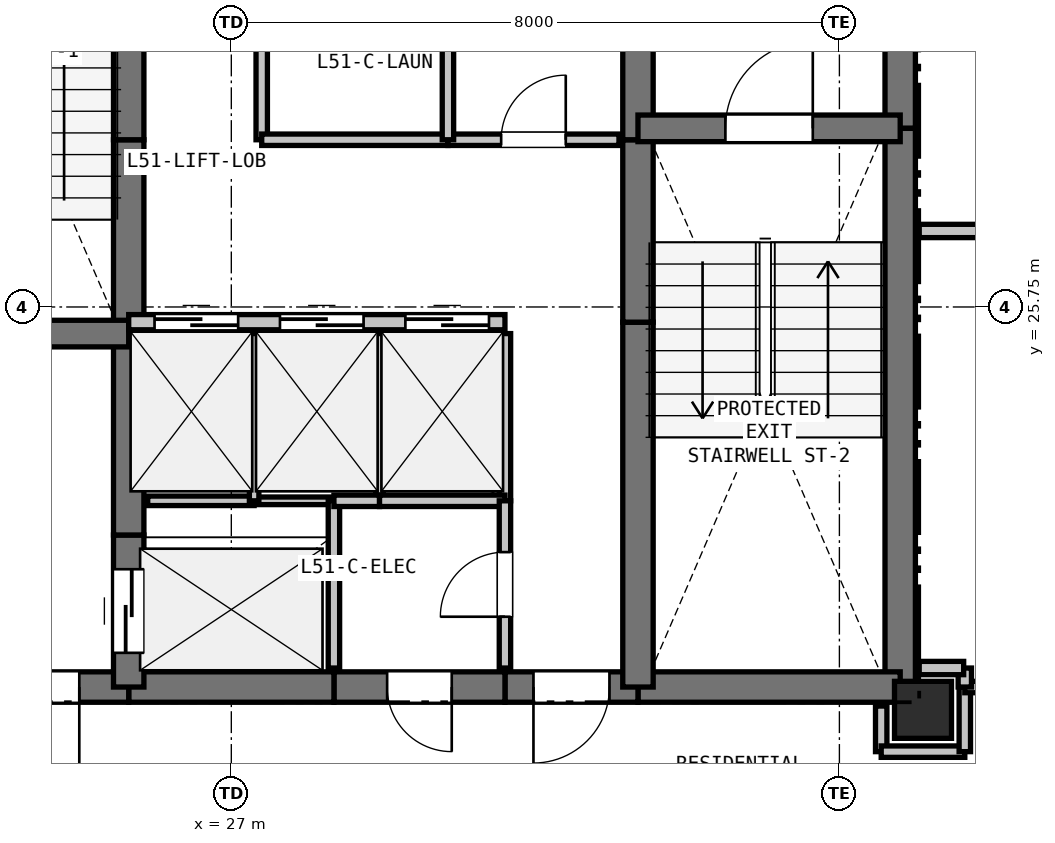
"""IFC4 building model, lengths in metres.
Left out: names, types, materials, properties, quantities, classifications, styles, units other than length and angle.
Written with IfcOpenShell. Run it as: python <this file> out.ifc"""

import sys

from ifc_helpers import new_model, si_unit, direction, frame, frame_2d, origin, origin_2d, place, context, subcontext, project, spatial, rectangle, extrude, element, fill, save


model = new_model("IFC4")
c1 = context("Model", 3, precision=1e-05, world=origin(), true_north=direction((0.0, 1.0)))
c2 = subcontext(c1, "Body", "Model", "MODEL_VIEW")
j1 = project(units=[si_unit("LENGTHUNIT", "METRE"), si_unit("PLANEANGLEUNIT", "RADIAN")], contexts=[c1])
p1 = place(None, origin())
s1 = spatial("IfcSite", under=j1, at=p1, CompositionType="ELEMENT")
p2 = place(p1, origin())
s2 = spatial("IfcBuilding", under=s1, at=p2, CompositionType="ELEMENT")
p3 = place(p2, frame((0.0, 0.0, 185.4)))
s3 = spatial("IfcBuildingStorey", under=s2, at=p3, CompositionType="ELEMENT", Elevation=185.4)
p4 = place(p3, frame((36.1, 20.45, 0.0), z_axis=(0.0, 0.0, 1.0), x_axis=(1.0, 0.0, 0.0)))
e1 = element("IfcColumn", 1, at=p4, inside=s3, PredefinedType="COLUMN", context=c2, shape_type="SweptSolid", body=[
    extrude(rectangle(XDim=0.75, YDim=0.75, at=origin_2d()), origin(), (0.0, 0.0, 1.0), 3.3),
])
p5 = place(p3, frame((35.8, 32.75, 0.0), z_axis=(0.0, 0.0, 1.0), x_axis=(0.0, -1.0, 0.0)))
e2 = element("IfcWall", 2, at=p5, inside=s3, PredefinedType="SHEAR", context=c2, shape_type="SweptSolid", body=[
    extrude(rectangle(XDim=4.65, YDim=0.4, at=frame_2d((2.325, 0.0))), origin(), (0.0, 0.0, 1.0), 3.07),
])
p6 = place(p3, frame((35.8, 28.1, 0.0), z_axis=(0.0, 0.0, 1.0), x_axis=(0.0, -1.0, 0.0)))
e3 = element("IfcWall", 3, at=p6, inside=s3, PredefinedType="SHEAR", context=c2, shape_type="SweptSolid", body=[
    extrude(rectangle(XDim=7.35, YDim=0.4, at=frame_2d((3.675, 0.0))), origin(), (0.0, 0.0, 1.0), 3.07),
])
p7 = place(p3, frame((35.8, 20.75, 0.0), z_axis=(0.0, 0.0, 1.0), x_axis=(-1.0, 0.0, 0.0)))
e4 = element("IfcWall", 4, at=p7, inside=s3, PredefinedType="SHEAR", context=c2, shape_type="SweptSolid", body=[
    extrude(rectangle(XDim=3.45, YDim=0.4, at=frame_2d((1.725, 0.0))), origin(), (0.0, 0.0, 1.0), 3.07),
])
p8 = place(p3, frame((32.35, 20.75, 0.0), z_axis=(0.0, 0.0, 1.0), x_axis=(-1.0, 0.0, 0.0)))
e5 = element("IfcWall", 5, at=p8, inside=s3, PredefinedType="SHEAR", context=c2, shape_type="SweptSolid", body=[
    extrude(rectangle(XDim=1.75, YDim=0.4, at=frame_2d((0.875, 0.0))), origin(), (0.0, 0.0, 1.0), 3.07),
])
p9 = place(p8, frame((0.375, 0.0, 0.0)))
e6 = element("IfcOpeningElement", 6, at=p9, cuts=e5, PredefinedType="OPENING", context=c2, shape_type="SweptSolid", body=[
    extrude(rectangle(XDim=1.0, YDim=2.15, at=frame_2d((0.5, 1.075))), frame((0.0, 0.21, 0.0), z_axis=(0.0, -1.0, 0.0), x_axis=(1.0, 0.0, 0.0)), (0.0, 0.0, 1.0), 0.42),
])
p10 = place(p3, frame((30.6, 20.75, 0.0), z_axis=(0.0, 0.0, 1.0), x_axis=(-1.0, 0.0, 0.0)))
e7 = element("IfcWall", 7, at=p10, inside=s3, PredefinedType="SHEAR", context=c2, shape_type="SweptSolid", body=[
    extrude(rectangle(XDim=2.25, YDim=0.4, at=frame_2d((1.125, 0.0))), origin(), (0.0, 0.0, 1.0), 3.07),
])
p11 = place(p10, frame((0.7, 0.0, 0.0)))
e8 = element("IfcOpeningElement", 8, at=p11, cuts=e7, PredefinedType="OPENING", context=c2, shape_type="SweptSolid", body=[
    extrude(rectangle(XDim=0.85, YDim=2.1, at=frame_2d((0.425, 1.05))), frame((0.0, 0.21, 0.0), z_axis=(0.0, -1.0, 0.0), x_axis=(1.0, 0.0, 0.0)), (0.0, 0.0, 1.0), 0.42),
])
p12 = place(p3, frame((28.35, 20.75, 0.0), z_axis=(0.0, 0.0, 1.0), x_axis=(-1.0, 0.0, 0.0)))
e9 = element("IfcWall", 9, at=p12, inside=s3, PredefinedType="SHEAR", context=c2, shape_type="SweptSolid", body=[
    extrude(rectangle(XDim=2.7, YDim=0.4, at=frame_2d((1.35, 0.0))), origin(), (0.0, 0.0, 1.0), 3.07),
])
p13 = place(p3, frame((25.65, 20.75, 0.0), z_axis=(0.0, 0.0, 1.0), x_axis=(-1.0, 0.0, 0.0)))
e10 = element("IfcWall", 10, at=p13, inside=s3, PredefinedType="SHEAR", context=c2, shape_type="SweptSolid", body=[
    extrude(rectangle(XDim=3.45, YDim=0.4, at=frame_2d((1.725, 0.0))), origin(), (0.0, 0.0, 1.0), 3.07),
])
p14 = place(p13, frame((0.65, 0.0, 0.0)))
e11 = element("IfcOpeningElement", 11, at=p14, cuts=e10, PredefinedType="OPENING", context=c2, shape_type="SweptSolid", body=[
    extrude(rectangle(XDim=1.15, YDim=2.15, at=frame_2d((0.575, 1.075))), frame((0.0, 0.21, 0.0), z_axis=(0.0, -1.0, 0.0), x_axis=(1.0, 0.0, 0.0)), (0.0, 0.0, 1.0), 0.42),
])
p15 = place(p3, frame((25.65, 20.75, 0.0), z_axis=(0.0, 0.0, 1.0), x_axis=(0.0, 1.0, 0.0)))
e12 = element("IfcWall", 12, at=p15, inside=s3, PredefinedType="SHEAR", context=c2, shape_type="SweptSolid", body=[
    extrude(rectangle(XDim=2.0, YDim=0.4, at=frame_2d((1.0, 0.0))), origin(), (0.0, 0.0, 1.0), 3.07),
])
p16 = place(p15, frame((0.45, 0.0, 0.0)))
e13 = element("IfcOpeningElement", 13, at=p16, cuts=e12, PredefinedType="OPENING", context=c2, shape_type="SweptSolid", body=[
    extrude(rectangle(XDim=1.1, YDim=2.15, at=frame_2d((0.55, 1.075))), frame((0.0, 0.21, 0.0), z_axis=(0.0, -1.0, 0.0), x_axis=(1.0, 0.0, 0.0)), (0.0, 0.0, 1.0), 0.42),
])
p17 = place(p3, frame((25.65, 22.75, 0.0), z_axis=(0.0, 0.0, 1.0), x_axis=(0.0, 1.0, 0.0)))
e14 = element("IfcWall", 14, at=p17, inside=s3, PredefinedType="SHEAR", context=c2, shape_type="SweptSolid", body=[
    extrude(rectangle(XDim=2.8, YDim=0.4, at=frame_2d((1.4, 0.0))), origin(), (0.0, 0.0, 1.0), 3.07),
])
p18 = place(p3, frame((25.65, 25.55, 0.0), z_axis=(0.0, 0.0, 1.0), x_axis=(0.0, 1.0, 0.0)))
e15 = element("IfcWall", 15, at=p18, inside=s3, PredefinedType="SHEAR", context=c2, shape_type="SweptSolid", body=[
    extrude(rectangle(XDim=2.4, YDim=0.4, at=frame_2d((1.2, 0.0))), origin(), (0.0, 0.0, 1.0), 3.07),
])
for number, where, z_axis, x_axis in (
    (16, (25.65, 27.95, 0.0), (0.0, 0.0, 1.0), (0.0, 1.0, 0.0)),
    (17, (32.35, 20.75, 0.0), (0.0, 0.0, 1.0), (0.0, 1.0, 0.0)),
):
    element("IfcWall", number, at=place(p3, frame(where, z_axis=z_axis, x_axis=x_axis)), inside=s3, PredefinedType="SHEAR", context=c2, shape_type="SweptSolid", body=[
        extrude(rectangle(XDim=4.8, YDim=0.4, at=frame_2d((2.4, 0.0))), origin(), (0.0, 0.0, 1.0), 3.07),
    ])
p19 = place(p3, frame((32.35, 25.55, 0.0), z_axis=(0.0, 0.0, 1.0), x_axis=(0.0, 1.0, 0.0)))
e18 = element("IfcWall", 18, at=p19, inside=s3, PredefinedType="SHEAR", context=c2, shape_type="SweptSolid", body=[
    extrude(rectangle(XDim=2.4, YDim=0.4, at=frame_2d((1.2, 0.0))), origin(), (0.0, 0.0, 1.0), 3.07),
])
p20 = place(p3, frame((32.35, 27.95, 0.0), z_axis=(0.0, 0.0, 1.0), x_axis=(0.0, 1.0, 0.0)))
e19 = element("IfcWall", 19, at=p20, inside=s3, PredefinedType="SHEAR", context=c2, shape_type="SweptSolid", body=[
    extrude(rectangle(XDim=2.8, YDim=0.4, at=frame_2d((1.4, 0.0))), origin(), (0.0, 0.0, 1.0), 3.07),
])
p21 = place(p3, frame((22.2, 25.4, 0.0), z_axis=(0.0, 0.0, 1.0), x_axis=(1.0, 0.0, 0.0)))
e20 = element("IfcWall", 20, at=p21, inside=s3, PredefinedType="SHEAR", context=c2, shape_type="SweptSolid", body=[
    extrude(rectangle(XDim=3.45, YDim=0.35, at=frame_2d((1.725, 0.0))), origin(), (0.0, 0.0, 1.0), 3.07),
])
p22 = place(p21, frame((1.15, 0.0, 0.0)))
e21 = element("IfcOpeningElement", 21, at=p22, cuts=e20, PredefinedType="OPENING", context=c2, shape_type="SweptSolid", body=[
    extrude(rectangle(XDim=1.15, YDim=2.15, at=frame_2d((0.575, 1.075))), frame((0.0, 0.185, 0.0), z_axis=(0.0, -1.0, 0.0), x_axis=(1.0, 0.0, 0.0)), (0.0, 0.0, 1.0), 0.37),
])
p23 = place(p3, frame((32.35, 28.1, 0.0), z_axis=(0.0, 0.0, 1.0), x_axis=(1.0, 0.0, 0.0)))
e22 = element("IfcWall", 22, at=p23, inside=s3, PredefinedType="SHEAR", context=c2, shape_type="SweptSolid", body=[
    extrude(rectangle(XDim=3.45, YDim=0.35, at=frame_2d((1.725, 0.0))), origin(), (0.0, 0.0, 1.0), 3.07),
])
p24 = place(p23, frame((1.15, 0.0, 0.0)))
e23 = element("IfcOpeningElement", 23, at=p24, cuts=e22, PredefinedType="OPENING", context=c2, shape_type="SweptSolid", body=[
    extrude(rectangle(XDim=1.15, YDim=2.15, at=frame_2d((0.575, 1.075))), frame((0.0, 0.185, 0.0), z_axis=(0.0, -1.0, 0.0), x_axis=(1.0, 0.0, 0.0)), (0.0, 0.0, 1.0), 0.37),
])
p25 = place(p3, frame((25.65, 25.55, 0.0), z_axis=(0.0, 0.0, 1.0), x_axis=(1.0, 0.0, 0.0)))
e24 = element("IfcWall", 24, at=p25, inside=s3, PredefinedType="PARTITIONING", context=c2, shape_type="SweptSolid", body=[
    extrude(rectangle(XDim=4.95, YDim=0.2, at=frame_2d((2.475, 0.0))), origin(), (0.0, 0.0, 1.0), 3.07),
])
p26 = place(p25, frame((0.34, 0.0, 0.0)))
e25 = element("IfcOpeningElement", 25, at=p26, cuts=e24, PredefinedType="OPENING", context=c2, shape_type="SweptSolid", body=[
    extrude(rectangle(XDim=1.1, YDim=2.15, at=frame_2d((0.55, 1.075))), frame((0.0, 0.11, 0.0), z_axis=(0.0, -1.0, 0.0), x_axis=(1.0, 0.0, 0.0)), (0.0, 0.0, 1.0), 0.22),
])
p27 = place(p25, frame((1.99, 0.0, 0.0)))
e26 = element("IfcOpeningElement", 26, at=p27, cuts=e24, PredefinedType="OPENING", context=c2, shape_type="SweptSolid", body=[
    extrude(rectangle(XDim=1.1, YDim=2.15, at=frame_2d((0.55, 1.075))), frame((0.0, 0.11, 0.0), z_axis=(0.0, -1.0, 0.0), x_axis=(1.0, 0.0, 0.0)), (0.0, 0.0, 1.0), 0.22),
])
p28 = place(p25, frame((3.64, 0.0, 0.0)))
e27 = element("IfcOpeningElement", 27, at=p28, cuts=e24, PredefinedType="OPENING", context=c2, shape_type="SweptSolid", body=[
    extrude(rectangle(XDim=1.1, YDim=2.15, at=frame_2d((0.55, 1.075))), frame((0.0, 0.11, 0.0), z_axis=(0.0, -1.0, 0.0), x_axis=(1.0, 0.0, 0.0)), (0.0, 0.0, 1.0), 0.22),
])
p29 = place(p3, frame((25.9, 23.2, 0.0), z_axis=(0.0, 0.0, 1.0), x_axis=(1.0, 0.0, 0.0)))
e28 = element("IfcWall", 28, at=p29, inside=s3, PredefinedType="PARTITIONING", context=c2, shape_type="SweptSolid", body=[
    extrude(rectangle(XDim=1.4, YDim=0.125, at=frame_2d((0.7, 0.0))), origin(), (0.0, 0.0, 1.0), 3.07),
])
p30 = place(p3, frame((27.3, 23.2, 0.0), z_axis=(0.0, 0.0, 1.0), x_axis=(1.0, 0.0, 0.0)))
e29 = element("IfcWall", 29, at=p30, inside=s3, PredefinedType="PARTITIONING", context=c2, shape_type="SweptSolid", body=[
    extrude(rectangle(XDim=1.05, YDim=0.1, at=frame_2d((0.525, 0.0))), origin(), (0.0, 0.0, 1.0), 3.07),
])
p31 = place(p3, frame((28.35, 23.2, 0.0), z_axis=(0.0, 0.0, 1.0), x_axis=(0.0, -1.0, 0.0)))
e30 = element("IfcWall", 30, at=p31, inside=s3, PredefinedType="PARTITIONING", context=c2, shape_type="SweptSolid", body=[
    extrude(rectangle(XDim=2.2, YDim=0.15, at=frame_2d((1.1, 0.0))), origin(), (0.0, 0.0, 1.0), 3.07),
])
p32 = place(p3, frame((27.3, 25.4, 0.0), z_axis=(0.0, 0.0, 1.0), x_axis=(0.0, -1.0, 0.0)))
e31 = element("IfcWall", 31, at=p32, inside=s3, PredefinedType="PARTITIONING", context=c2, shape_type="SweptSolid", body=[
    extrude(rectangle(XDim=2.2, YDim=0.125, at=frame_2d((1.1, 0.0))), origin(), (0.0, 0.0, 1.0), 3.07),
])
p33 = place(p3, frame((28.95, 25.4, 0.0), z_axis=(0.0, 0.0, 1.0), x_axis=(0.0, -1.0, 0.0)))
e32 = element("IfcWall", 32, at=p33, inside=s3, PredefinedType="PARTITIONING", context=c2, shape_type="SweptSolid", body=[
    extrude(rectangle(XDim=2.2, YDim=0.1, at=frame_2d((1.1, 0.0))), origin(), (0.0, 0.0, 1.0), 3.07),
])
p34 = place(p3, frame((28.95, 23.2, 0.0), z_axis=(0.0, 0.0, 1.0), x_axis=(-1.0, 0.0, 0.0)))
e33 = element("IfcWall", 33, at=p34, inside=s3, PredefinedType="PARTITIONING", context=c2, shape_type="SweptSolid", body=[
    extrude(rectangle(XDim=0.6, YDim=0.15, at=frame_2d((0.3, 0.0))), origin(), (0.0, 0.0, 1.0), 3.07),
])
p35 = place(p3, frame((30.6, 25.4, 0.0), z_axis=(0.0, 0.0, 1.0), x_axis=(0.0, -1.0, 0.0)))
e34 = element("IfcWall", 34, at=p35, inside=s3, PredefinedType="PARTITIONING", context=c2, shape_type="SweptSolid", body=[
    extrude(rectangle(XDim=2.2, YDim=0.15, at=frame_2d((1.1, 0.0))), origin(), (0.0, 0.0, 1.0), 3.07),
])
p36 = place(p3, frame((30.6, 23.2, 0.0), z_axis=(0.0, 0.0, 1.0), x_axis=(-1.0, 0.0, 0.0)))
e35 = element("IfcWall", 35, at=p36, inside=s3, PredefinedType="PARTITIONING", context=c2, shape_type="SweptSolid", body=[
    extrude(rectangle(XDim=1.65, YDim=0.15, at=frame_2d((0.825, 0.0))), origin(), (0.0, 0.0, 1.0), 3.07),
])
p37 = place(p3, frame((30.6, 21.0, 0.0), z_axis=(0.0, 0.0, 1.0), x_axis=(0.0, 1.0, 0.0)))
e36 = element("IfcWall", 36, at=p37, inside=s3, PredefinedType="PARTITIONING", context=c2, shape_type="SweptSolid", body=[
    extrude(rectangle(XDim=2.2, YDim=0.15, at=frame_2d((1.1, 0.0))), origin(), (0.0, 0.0, 1.0), 3.07),
])
p38 = place(p37, frame((0.675, 0.0, 0.0)))
e37 = element("IfcOpeningElement", 37, at=p38, cuts=e36, PredefinedType="OPENING", context=c2, shape_type="SweptSolid", body=[
    extrude(rectangle(XDim=0.85, YDim=2.1, at=frame_2d((0.425, 1.05))), frame((0.0, 0.085, 0.0), z_axis=(0.0, -1.0, 0.0), x_axis=(1.0, 0.0, 0.0)), (0.0, 0.0, 1.0), 0.17),
])
p39 = place(p3, frame((27.4, 32.5, 0.0), z_axis=(0.0, 0.0, 1.0), x_axis=(0.0, -1.0, 0.0)))
e38 = element("IfcWall", 38, at=p39, inside=s3, PredefinedType="PARTITIONING", context=c2, shape_type="SweptSolid", body=[
    extrude(rectangle(XDim=4.55, YDim=0.15, at=frame_2d((2.275, 0.0))), origin(), (0.0, 0.0, 1.0), 3.07),
])
p40 = place(p39, frame((1.775, 0.0, 0.0)))
e39 = element("IfcOpeningElement", 39, at=p40, cuts=e38, PredefinedType="OPENING", context=c2, shape_type="SweptSolid", body=[
    extrude(rectangle(XDim=1.0, YDim=2.15, at=frame_2d((0.5, 1.075))), frame((0.0, 0.085, 0.0), z_axis=(0.0, -1.0, 0.0), x_axis=(1.0, 0.0, 0.0)), (0.0, 0.0, 1.0), 0.17),
])
p41 = place(p3, frame((27.4, 27.95, 0.0), z_axis=(0.0, 0.0, 1.0), x_axis=(1.0, 0.0, 0.0)))
e40 = element("IfcWall", 40, at=p41, inside=s3, PredefinedType="PARTITIONING", context=c2, shape_type="SweptSolid", body=[
    extrude(rectangle(XDim=2.45, YDim=0.15, at=frame_2d((1.225, 0.0))), origin(), (0.0, 0.0, 1.0), 3.07),
])
p42 = place(p3, frame((29.85, 27.95, 0.0), z_axis=(0.0, 0.0, 1.0), x_axis=(1.0, 0.0, 0.0)))
e41 = element("IfcWall", 41, at=p42, inside=s3, PredefinedType="PARTITIONING", context=c2, shape_type="SweptSolid", body=[
    extrude(rectangle(XDim=2.25, YDim=0.15, at=frame_2d((1.125, 0.0))), origin(), (0.0, 0.0, 1.0), 3.07),
])
p43 = place(p42, frame((0.7, 0.0, 0.0)))
e42 = element("IfcOpeningElement", 42, at=p43, cuts=e41, PredefinedType="OPENING", context=c2, shape_type="SweptSolid", body=[
    extrude(rectangle(XDim=0.85, YDim=2.1, at=frame_2d((0.425, 1.05))), frame((0.0, 0.085, 0.0), z_axis=(0.0, -1.0, 0.0), x_axis=(1.0, 0.0, 0.0)), (0.0, 0.0, 1.0), 0.17),
])
p44 = place(p3, frame((35.55, 20.5, 0.0), z_axis=(0.0, 0.0, 1.0), x_axis=(0.0, -1.0, 0.0)))
e43 = element("IfcWall", 43, at=p44, inside=s3, PredefinedType="PARTITIONING", context=c2, shape_type="SweptSolid", body=[
    extrude(rectangle(XDim=0.6, YDim=0.15, at=frame_2d((0.3, 0.0))), origin(), (0.0, 0.0, 1.0), 2.595),
])
p45 = place(p3, frame((35.55, 19.9, 0.0), z_axis=(0.0, 0.0, 1.0), x_axis=(1.0, 0.0, 0.0)))
e44 = element("IfcWall", 44, at=p45, inside=s3, PredefinedType="PARTITIONING", context=c2, shape_type="SweptSolid", body=[
    extrude(rectangle(XDim=1.1, YDim=0.15, at=frame_2d((0.55, 0.0))), origin(), (0.0, 0.0, 1.0), 2.518),
])
p46 = place(p3, frame((36.65, 19.9, 0.0), z_axis=(0.0, 0.0, 1.0), x_axis=(0.0, 1.0, 0.0)))
e45 = element("IfcWall", 45, at=p46, inside=s3, PredefinedType="PARTITIONING", context=c2, shape_type="SweptSolid", body=[
    extrude(rectangle(XDim=0.85, YDim=0.15, at=frame_2d((0.425, 0.0))), origin(), (0.0, 0.0, 1.0), 3.07),
])
p47 = place(p3, frame((36.65, 20.75, 0.0), z_axis=(0.0, 0.0, 1.0), x_axis=(1.0, 0.0, 0.0)))
e46 = element("IfcWall", 46, at=p47, inside=s3, PredefinedType="PARTITIONING", context=c2, shape_type="SweptSolid", body=[
    extrude(rectangle(XDim=2.55, YDim=0.15, at=frame_2d((1.275, 0.0))), origin(), (0.0, 0.0, 1.0), 3.07),
])
p48 = place(p47, frame((0.85, 0.0, 0.0)))
e47 = element("IfcOpeningElement", 47, at=p48, cuts=e46, PredefinedType="OPENING", context=c2, shape_type="SweptSolid", body=[
    extrude(rectangle(XDim=0.85, YDim=2.1, at=frame_2d((0.425, 1.05))), frame((0.0, 0.085, 0.0), z_axis=(0.0, -1.0, 0.0), x_axis=(1.0, 0.0, 0.0)), (0.0, 0.0, 1.0), 0.17),
])
p49 = place(p3, frame((40.55, 26.75, 0.0), z_axis=(0.0, 0.0, 1.0), x_axis=(-1.0, 0.0, 0.0)))
e48 = element("IfcWall", 48, at=p49, inside=s3, PredefinedType="PLUMBINGWALL", context=c2, shape_type="SweptSolid", body=[
    extrude(rectangle(XDim=4.5, YDim=0.175, at=frame_2d((2.25, 0.0))), origin(), (0.0, 0.0, 1.0), 2.365),
])
p50 = place(p3, frame((36.65, 20.75, 0.0), z_axis=(0.0, 0.0, 1.0), x_axis=(0.0, 1.0, 0.0)))
e49 = element("IfcWall", 49, at=p50, inside=s3, PredefinedType="PLUMBINGWALL", context=c2, shape_type="SweptSolid", body=[
    extrude(rectangle(XDim=0.25, YDim=0.175, at=frame_2d((0.125, 0.0))), origin(), (0.0, 0.0, 1.0), 3.07),
])
p51 = place(p3, frame((36.635, 21.0, 0.0), z_axis=(0.0, 0.0, 1.0), x_axis=(-1.0, 0.0, 0.0)))
e50 = element("IfcWall", 50, at=p51, inside=s3, PredefinedType="PLUMBINGWALL", context=c2, shape_type="SweptSolid", body=[
    extrude(rectangle(XDim=0.585, YDim=0.175, at=frame_2d((0.292, 0.0))), origin(), (0.0, 0.0, 1.0), 2.595),
])
p52 = place(p3, frame((29.85, 30.3, 0.0), z_axis=(0.0, 0.0, 1.0), x_axis=(0.0, -1.0, 0.0)))
e51 = element("IfcWall", 51, at=p52, inside=s3, PredefinedType="PARTITIONING", context=c2, shape_type="SweptSolid", body=[
    extrude(rectangle(XDim=2.35, YDim=0.15, at=frame_2d((1.175, 0.0))), origin(), (0.0, 0.0, 1.0), 3.07),
])
p53 = place(p26, origin())
e52 = element("IfcDoor", 52, at=p53, inside=s3, OperationType="SLIDING_TO_LEFT", PredefinedType="DOOR", context=c2, shape_type="SweptSolid", body=[
    extrude(rectangle(XDim=1.1, YDim=2.15, at=frame_2d((0.55, 1.075))), frame((0.0, 0.025, 0.0), z_axis=(0.0, -1.0, 0.0), x_axis=(1.0, 0.0, 0.0)), (0.0, 0.0, 1.0), 0.05),
])
fill(e25, e52)
p54 = place(p27, origin())
e53 = element("IfcDoor", 53, at=p54, inside=s3, OperationType="SLIDING_TO_LEFT", PredefinedType="DOOR", context=c2, shape_type="SweptSolid", body=[
    extrude(rectangle(XDim=1.1, YDim=2.15, at=frame_2d((0.55, 1.075))), frame((0.0, 0.025, 0.0), z_axis=(0.0, -1.0, 0.0), x_axis=(1.0, 0.0, 0.0)), (0.0, 0.0, 1.0), 0.05),
])
fill(e26, e53)
p55 = place(p28, origin())
e54 = element("IfcDoor", 54, at=p55, inside=s3, OperationType="SLIDING_TO_LEFT", PredefinedType="DOOR", context=c2, shape_type="SweptSolid", body=[
    extrude(rectangle(XDim=1.1, YDim=2.15, at=frame_2d((0.55, 1.075))), frame((0.0, 0.025, 0.0), z_axis=(0.0, -1.0, 0.0), x_axis=(1.0, 0.0, 0.0)), (0.0, 0.0, 1.0), 0.05),
])
fill(e27, e54)
p56 = place(p9, origin())
e55 = element("IfcDoor", 55, at=p56, inside=s3, OperationType="SINGLE_SWING_RIGHT", PredefinedType="DOOR", context=c2, shape_type="SweptSolid", body=[
    extrude(rectangle(XDim=1.0, YDim=2.15, at=frame_2d((0.5, 1.075))), frame((0.0, 0.025, 0.0), z_axis=(0.0, -1.0, 0.0), x_axis=(1.0, 0.0, 0.0)), (0.0, 0.0, 1.0), 0.05),
])
fill(e6, e55)
p57 = place(p16, origin())
e56 = element("IfcDoor", 56, at=p57, inside=s3, OperationType="SLIDING_TO_LEFT", PredefinedType="DOOR", context=c2, shape_type="SweptSolid", body=[
    extrude(rectangle(XDim=1.1, YDim=2.15, at=frame_2d((0.55, 1.075))), frame((0.0, 0.025, 0.0), z_axis=(0.0, -1.0, 0.0), x_axis=(1.0, 0.0, 0.0)), (0.0, 0.0, 1.0), 0.05),
])
fill(e13, e56)
p58 = place(p24, origin())
e57 = element("IfcDoor", 57, at=p58, inside=s3, OperationType="SINGLE_SWING_RIGHT", PredefinedType="DOOR", context=c2, shape_type="SweptSolid", body=[
    extrude(rectangle(XDim=1.15, YDim=2.15, at=frame_2d((0.575, 1.075))), frame((0.0, 0.025, 0.0), z_axis=(0.0, -1.0, 0.0), x_axis=(1.0, 0.0, 0.0)), (0.0, 0.0, 1.0), 0.05),
])
fill(e23, e57)
p59 = place(p14, origin())
e58 = element("IfcDoor", 58, at=p59, inside=s3, OperationType="SINGLE_SWING_LEFT", PredefinedType="DOOR", context=c2, shape_type="SweptSolid", body=[
    extrude(rectangle(XDim=1.15, YDim=2.15, at=frame_2d((0.575, 1.075))), frame((0.0, 0.025, 0.0), z_axis=(0.0, -1.0, 0.0), x_axis=(1.0, 0.0, 0.0)), (0.0, 0.0, 1.0), 0.05),
])
fill(e11, e58)
p60 = place(p43, origin())
e59 = element("IfcDoor", 59, at=p60, inside=s3, OperationType="SINGLE_SWING_RIGHT", PredefinedType="DOOR", context=c2, shape_type="SweptSolid", body=[
    extrude(rectangle(XDim=0.85, YDim=2.1, at=frame_2d((0.425, 1.05))), frame((0.0, 0.025, 0.0), z_axis=(0.0, -1.0, 0.0), x_axis=(1.0, 0.0, 0.0)), (0.0, 0.0, 1.0), 0.05),
])
fill(e42, e59)
p61 = place(p38, origin())
e60 = element("IfcDoor", 60, at=p61, inside=s3, OperationType="SINGLE_SWING_LEFT", PredefinedType="DOOR", context=c2, shape_type="SweptSolid", body=[
    extrude(rectangle(XDim=0.85, YDim=2.1, at=frame_2d((0.425, 1.05))), frame((0.0, 0.025, 0.0), z_axis=(0.0, -1.0, 0.0), x_axis=(1.0, 0.0, 0.0)), (0.0, 0.0, 1.0), 0.05),
])
fill(e37, e60)
p62 = place(p11, origin())
e61 = element("IfcDoor", 61, at=p62, inside=s3, OperationType="SINGLE_SWING_LEFT", PredefinedType="DOOR", context=c2, shape_type="SweptSolid", body=[
    extrude(rectangle(XDim=0.85, YDim=2.1, at=frame_2d((0.425, 1.05))), frame((0.0, 0.025, 0.0), z_axis=(0.0, -1.0, 0.0), x_axis=(1.0, 0.0, 0.0)), (0.0, 0.0, 1.0), 0.05),
])
fill(e8, e61)
save(model, sys.argv[1])
